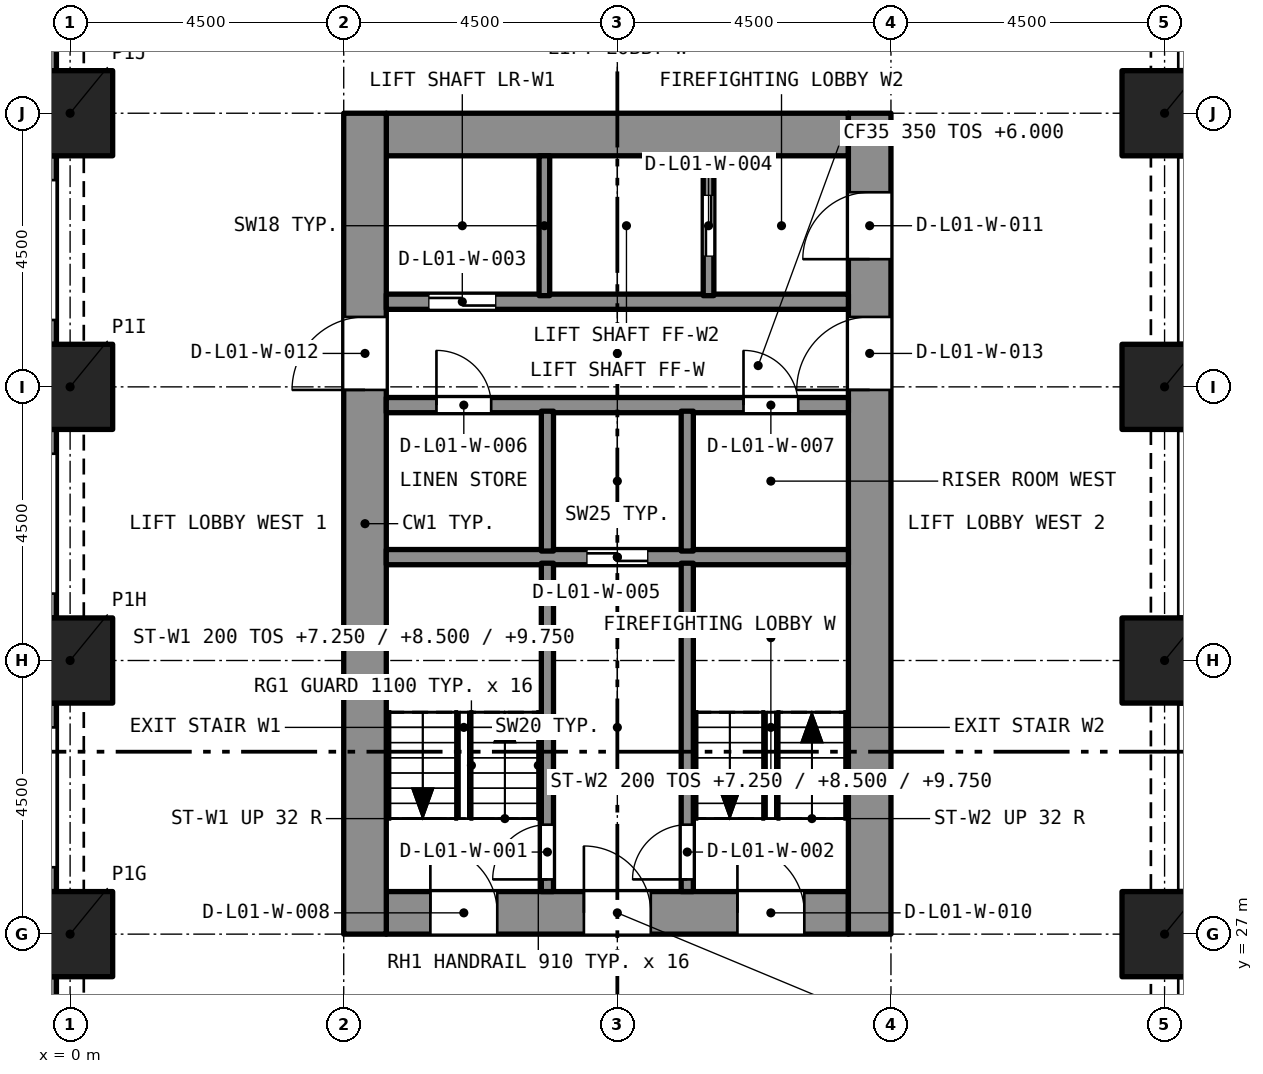
"""IFC4 building model, lengths in metres.
Left out: names, types, materials, properties, quantities, classifications, styles, units other than length and angle.
Written with IfcOpenShell. Run it as: python <this file> out.ifc"""

import sys

from ifc_helpers import new_model, si_unit, direction, frame, frame_2d, origin, origin_2d, place, context, subcontext, project, spatial, rectangle, extrude, element, fill, save


model = new_model("IFC4")
c1 = context("Model", 3, precision=1e-05, world=origin(), true_north=direction((0.0, 1.0)))
c2 = subcontext(c1, "Body", "Model", "MODEL_VIEW")
j1 = project(units=[si_unit("LENGTHUNIT", "METRE"), si_unit("PLANEANGLEUNIT", "RADIAN")], contexts=[c1])
p1 = place(None, origin())
s1 = spatial("IfcSite", under=j1, at=p1, CompositionType="ELEMENT")
p2 = place(p1, origin())
s2 = spatial("IfcBuilding", under=s1, at=p2, CompositionType="ELEMENT")
p3 = place(p2, frame((0.0, 0.0, 6.0)))
s3 = spatial("IfcBuildingStorey", under=s2, at=p3, CompositionType="ELEMENT", Elevation=6.0)
for number, where, z_axis, x_axis in (
    (1, (0.0, 27.0, 0.0), (0.0, 0.0, 1.0), (1.0, 0.0, 0.0)),
    (2, (18.0, 27.0, 0.0), (0.0, 0.0, 1.0), (1.0, 0.0, 0.0)),
    (3, (0.0, 31.5, 0.0), (0.0, 0.0, 1.0), (1.0, 0.0, 0.0)),
    (4, (18.0, 31.5, 0.0), (0.0, 0.0, 1.0), (1.0, 0.0, 0.0)),
    (5, (0.0, 36.0, 0.0), (0.0, 0.0, 1.0), (1.0, 0.0, 0.0)),
    (6, (18.0, 36.0, 0.0), (0.0, 0.0, 1.0), (1.0, 0.0, 0.0)),
    (7, (0.0, 40.5, 0.0), (0.0, 0.0, 1.0), (1.0, 0.0, 0.0)),
    (8, (18.0, 40.5, 0.0), (0.0, 0.0, 1.0), (1.0, 0.0, 0.0)),
):
    element("IfcColumn", number, at=place(p3, frame(where, z_axis=z_axis, x_axis=x_axis)), inside=s3, PredefinedType="COLUMN", context=c2, shape_type="SweptSolid", body=[
        extrude(rectangle(XDim=1.4, YDim=1.4, at=origin_2d()), origin(), (0.0, 0.0, 1.0), 5.0),
    ])
p4 = place(p3, frame((5.2, 27.35, 0.0), z_axis=(0.0, 0.0, 1.0), x_axis=(1.0, 0.0, 0.0)))
e9 = element("IfcWall", 9, at=p4, inside=s3, PredefinedType="SOLIDWALL", context=c2, shape_type="SweptSolid", body=[
    extrude(rectangle(XDim=7.6, YDim=0.7, at=frame_2d((3.8, 0.0))), origin(), (0.0, 0.0, 1.0), 5.0),
])
p5 = place(p4, frame((0.725, 0.0, 0.0)))
e10 = element("IfcOpeningElement", 10, at=p5, cuts=e9, PredefinedType="OPENING", context=c2, shape_type="SweptSolid", body=[
    extrude(rectangle(XDim=1.1, YDim=2.1, at=frame_2d((0.55, 1.05))), frame((0.0, 0.36, 0.0), z_axis=(0.0, -1.0, 0.0), x_axis=(1.0, 0.0, 0.0)), (0.0, 0.0, 1.0), 0.72),
])
p6 = place(p4, frame((3.25, 0.0, 0.0)))
e11 = element("IfcOpeningElement", 11, at=p6, cuts=e9, PredefinedType="OPENING", context=c2, shape_type="SweptSolid", body=[
    extrude(rectangle(XDim=1.1, YDim=2.1, at=frame_2d((0.55, 1.05))), frame((0.0, 0.36, 0.0), z_axis=(0.0, -1.0, 0.0), x_axis=(1.0, 0.0, 0.0)), (0.0, 0.0, 1.0), 0.72),
])
p7 = place(p4, frame((5.775, 0.0, 0.0)))
e12 = element("IfcOpeningElement", 12, at=p7, cuts=e9, PredefinedType="OPENING", context=c2, shape_type="SweptSolid", body=[
    extrude(rectangle(XDim=1.1, YDim=2.1, at=frame_2d((0.55, 1.05))), frame((0.0, 0.36, 0.0), z_axis=(0.0, -1.0, 0.0), x_axis=(1.0, 0.0, 0.0)), (0.0, 0.0, 1.0), 0.72),
])
p8 = place(p3, frame((5.2, 40.15, 0.0), z_axis=(0.0, 0.0, 1.0), x_axis=(1.0, 0.0, 0.0)))
e13 = element("IfcWall", 13, at=p8, inside=s3, PredefinedType="SOLIDWALL", context=c2, shape_type="SweptSolid", body=[
    extrude(rectangle(XDim=7.6, YDim=0.7, at=frame_2d((3.8, 0.0))), origin(), (0.0, 0.0, 1.0), 5.0),
])
p9 = place(p3, frame((4.85, 27.0, 0.0), z_axis=(0.0, 0.0, 1.0), x_axis=(0.0, 1.0, 0.0)))
e14 = element("IfcWall", 14, at=p9, inside=s3, PredefinedType="SOLIDWALL", context=c2, shape_type="SweptSolid", body=[
    extrude(rectangle(XDim=13.5, YDim=0.7, at=frame_2d((6.75, 0.0))), origin(), (0.0, 0.0, 1.0), 5.0),
])
p10 = place(p9, frame((8.95, 0.0, 0.0)))
e15 = element("IfcOpeningElement", 15, at=p10, cuts=e14, PredefinedType="OPENING", context=c2, shape_type="SweptSolid", body=[
    extrude(rectangle(XDim=1.2, YDim=2.1, at=frame_2d((0.6, 1.05))), frame((0.0, 0.36, 0.0), z_axis=(0.0, -1.0, 0.0), x_axis=(1.0, 0.0, 0.0)), (0.0, 0.0, 1.0), 0.72),
])
p11 = place(p3, frame((13.15, 27.0, 0.0), z_axis=(0.0, 0.0, 1.0), x_axis=(0.0, 1.0, 0.0)))
e16 = element("IfcWall", 16, at=p11, inside=s3, PredefinedType="SOLIDWALL", context=c2, shape_type="SweptSolid", body=[
    extrude(rectangle(XDim=13.5, YDim=0.7, at=frame_2d((6.75, 0.0))), origin(), (0.0, 0.0, 1.0), 5.0),
])
p12 = place(p11, frame((11.1, 0.0, 0.0)))
e17 = element("IfcOpeningElement", 17, at=p12, cuts=e16, PredefinedType="OPENING", context=c2, shape_type="SweptSolid", body=[
    extrude(rectangle(XDim=1.1, YDim=2.1, at=frame_2d((0.55, 1.05))), frame((0.0, 0.36, 0.0), z_axis=(0.0, -1.0, 0.0), x_axis=(1.0, 0.0, 0.0)), (0.0, 0.0, 1.0), 0.72),
])
p13 = place(p11, frame((8.95, 0.0, 0.0)))
e18 = element("IfcOpeningElement", 18, at=p13, cuts=e16, PredefinedType="OPENING", context=c2, shape_type="SweptSolid", body=[
    extrude(rectangle(XDim=1.2, YDim=2.1, at=frame_2d((0.6, 1.05))), frame((0.0, 0.36, 0.0), z_axis=(0.0, -1.0, 0.0), x_axis=(1.0, 0.0, 0.0)), (0.0, 0.0, 1.0), 0.72),
])
p14 = place(p3, frame((-0.375, 41.2, 0.0), z_axis=(0.0, 0.0, 1.0), x_axis=(0.0, 1.0, 0.0)))
e19 = element("IfcWall", 19, at=p14, inside=s3, PredefinedType="SOLIDWALL", context=c2, shape_type="SweptSolid", body=[
    extrude(rectangle(XDim=3.1, YDim=0.3, at=frame_2d((1.55, 0.0))), origin(), (0.0, 0.0, 1.0), 5.0),
])
p15 = place(p14, frame((0.4, 0.0, 0.45)))
e20 = element("IfcOpeningElement", 20, at=p15, cuts=e19, PredefinedType="OPENING", context=c2, shape_type="SweptSolid", body=[
    extrude(rectangle(XDim=2.3, YDim=3.3, at=frame_2d((1.15, 1.65))), frame((0.0, 0.16, 0.0), z_axis=(0.0, -1.0, 0.0), x_axis=(1.0, 0.0, 0.0)), (0.0, 0.0, 1.0), 0.32),
])
p16 = place(p3, frame((-0.375, 36.7, 0.0), z_axis=(0.0, 0.0, 1.0), x_axis=(0.0, 1.0, 0.0)))
e21 = element("IfcWall", 21, at=p16, inside=s3, PredefinedType="SOLIDWALL", context=c2, shape_type="SweptSolid", body=[
    extrude(rectangle(XDim=3.1, YDim=0.3, at=frame_2d((1.55, 0.0))), origin(), (0.0, 0.0, 1.0), 5.0),
])
p17 = place(p16, frame((0.4, 0.0, 0.45)))
e22 = element("IfcOpeningElement", 22, at=p17, cuts=e21, PredefinedType="OPENING", context=c2, shape_type="SweptSolid", body=[
    extrude(rectangle(XDim=2.3, YDim=3.3, at=frame_2d((1.15, 1.65))), frame((0.0, 0.16, 0.0), z_axis=(0.0, -1.0, 0.0), x_axis=(1.0, 0.0, 0.0)), (0.0, 0.0, 1.0), 0.32),
])
p18 = place(p3, frame((-0.375, 32.2, 0.0), z_axis=(0.0, 0.0, 1.0), x_axis=(0.0, 1.0, 0.0)))
e23 = element("IfcWall", 23, at=p18, inside=s3, PredefinedType="SOLIDWALL", context=c2, shape_type="SweptSolid", body=[
    extrude(rectangle(XDim=3.1, YDim=0.3, at=frame_2d((1.55, 0.0))), origin(), (0.0, 0.0, 1.0), 5.0),
])
p19 = place(p18, frame((0.4, 0.0, 0.45)))
e24 = element("IfcOpeningElement", 24, at=p19, cuts=e23, PredefinedType="OPENING", context=c2, shape_type="SweptSolid", body=[
    extrude(rectangle(XDim=2.3, YDim=3.3, at=frame_2d((1.15, 1.65))), frame((0.0, 0.16, 0.0), z_axis=(0.0, -1.0, 0.0), x_axis=(1.0, 0.0, 0.0)), (0.0, 0.0, 1.0), 0.32),
])
p20 = place(p3, frame((-0.375, 27.7, 0.0), z_axis=(0.0, 0.0, 1.0), x_axis=(0.0, 1.0, 0.0)))
e25 = element("IfcWall", 25, at=p20, inside=s3, PredefinedType="SOLIDWALL", context=c2, shape_type="SweptSolid", body=[
    extrude(rectangle(XDim=3.1, YDim=0.3, at=frame_2d((1.55, 0.0))), origin(), (0.0, 0.0, 1.0), 5.0),
])
p21 = place(p20, frame((0.4, 0.0, 0.45)))
e26 = element("IfcOpeningElement", 26, at=p21, cuts=e25, PredefinedType="OPENING", context=c2, shape_type="SweptSolid", body=[
    extrude(rectangle(XDim=2.3, YDim=3.3, at=frame_2d((1.15, 1.65))), frame((0.0, 0.16, 0.0), z_axis=(0.0, -1.0, 0.0), x_axis=(1.0, 0.0, 0.0)), (0.0, 0.0, 1.0), 0.32),
])
p22 = place(p3, frame((-0.375, 23.2, 0.0), z_axis=(0.0, 0.0, 1.0), x_axis=(0.0, 1.0, 0.0)))
e27 = element("IfcWall", 27, at=p22, inside=s3, PredefinedType="SOLIDWALL", context=c2, shape_type="SweptSolid", body=[
    extrude(rectangle(XDim=3.1, YDim=0.3, at=frame_2d((1.55, 0.0))), origin(), (0.0, 0.0, 1.0), 5.0),
])
p23 = place(p22, frame((0.4, 0.0, 0.45)))
e28 = element("IfcOpeningElement", 28, at=p23, cuts=e27, PredefinedType="OPENING", context=c2, shape_type="SweptSolid", body=[
    extrude(rectangle(XDim=2.3, YDim=3.3, at=frame_2d((1.15, 1.65))), frame((0.0, 0.16, 0.0), z_axis=(0.0, -1.0, 0.0), x_axis=(1.0, 0.0, 0.0)), (0.0, 0.0, 1.0), 0.32),
])
p24 = place(p3, frame((5.2, 33.2, 0.0), z_axis=(0.0, 0.0, 1.0), x_axis=(1.0, 0.0, 0.0)))
e29 = element("IfcWall", 29, at=p24, inside=s3, PredefinedType="SOLIDWALL", context=c2, shape_type="SweptSolid", body=[
    extrude(rectangle(XDim=7.6, YDim=0.25, at=frame_2d((3.8, 0.0))), origin(), (0.0, 0.0, 1.0), 4.65),
])
p25 = place(p24, frame((3.3, 0.0, 0.0)))
e30 = element("IfcOpeningElement", 30, at=p25, cuts=e29, PredefinedType="OPENING", context=c2, shape_type="SweptSolid", body=[
    extrude(rectangle(XDim=1.0, YDim=2.1, at=frame_2d((0.5, 1.05))), frame((0.0, 0.135, 0.0), z_axis=(0.0, -1.0, 0.0), x_axis=(1.0, 0.0, 0.0)), (0.0, 0.0, 1.0), 0.27),
])
p26 = place(p3, frame((5.2, 35.7, 0.0), z_axis=(0.0, 0.0, 1.0), x_axis=(1.0, 0.0, 0.0)))
e31 = element("IfcWall", 31, at=p26, inside=s3, PredefinedType="SOLIDWALL", context=c2, shape_type="SweptSolid", body=[
    extrude(rectangle(XDim=7.6, YDim=0.25, at=frame_2d((3.8, 0.0))), origin(), (0.0, 0.0, 1.0), 4.65),
])
p27 = place(p26, frame((0.825, 0.0, 0.0)))
e32 = element("IfcOpeningElement", 32, at=p27, cuts=e31, PredefinedType="OPENING", context=c2, shape_type="SweptSolid", body=[
    extrude(rectangle(XDim=0.9, YDim=2.1, at=frame_2d((0.45, 1.05))), frame((0.0, 0.135, 0.0), z_axis=(0.0, -1.0, 0.0), x_axis=(1.0, 0.0, 0.0)), (0.0, 0.0, 1.0), 0.27),
])
p28 = place(p26, frame((5.875, 0.0, 0.0)))
e33 = element("IfcOpeningElement", 33, at=p28, cuts=e31, PredefinedType="OPENING", context=c2, shape_type="SweptSolid", body=[
    extrude(rectangle(XDim=0.9, YDim=2.1, at=frame_2d((0.45, 1.05))), frame((0.0, 0.135, 0.0), z_axis=(0.0, -1.0, 0.0), x_axis=(1.0, 0.0, 0.0)), (0.0, 0.0, 1.0), 0.27),
])
p29 = place(p3, frame((5.2, 37.4, 0.0), z_axis=(0.0, 0.0, 1.0), x_axis=(1.0, 0.0, 0.0)))
e34 = element("IfcWall", 34, at=p29, inside=s3, PredefinedType="SOLIDWALL", context=c2, shape_type="SweptSolid", body=[
    extrude(rectangle(XDim=7.6, YDim=0.25, at=frame_2d((3.8, 0.0))), origin(), (0.0, 0.0, 1.0), 4.65),
])
p30 = place(p29, frame((0.7, 0.0, 0.0)))
e35 = element("IfcOpeningElement", 35, at=p30, cuts=e34, PredefinedType="OPENING", context=c2, shape_type="SweptSolid", body=[
    extrude(rectangle(XDim=1.1, YDim=2.4, at=frame_2d((0.55, 1.2))), frame((0.0, 0.135, 0.0), z_axis=(0.0, -1.0, 0.0), x_axis=(1.0, 0.0, 0.0)), (0.0, 0.0, 1.0), 0.27),
])
p31 = place(p3, frame((7.85, 27.7, 0.0), z_axis=(0.0, 0.0, 1.0), x_axis=(0.0, 1.0, 0.0)))
e36 = element("IfcWall", 36, at=p31, inside=s3, PredefinedType="SOLIDWALL", context=c2, shape_type="SweptSolid", body=[
    extrude(rectangle(XDim=5.4, YDim=0.2, at=frame_2d((2.7, 0.0))), origin(), (0.0, 0.0, 1.0), 4.65),
])
p32 = place(p31, frame((0.2, 0.0, 0.0)))
e37 = element("IfcOpeningElement", 37, at=p32, cuts=e36, PredefinedType="OPENING", context=c2, shape_type="SweptSolid", body=[
    extrude(rectangle(XDim=0.9, YDim=2.1, at=frame_2d((0.45, 1.05))), frame((0.0, 0.11, 0.0), z_axis=(0.0, -1.0, 0.0), x_axis=(1.0, 0.0, 0.0)), (0.0, 0.0, 1.0), 0.22),
])
p33 = place(p3, frame((10.15, 27.7, 0.0), z_axis=(0.0, 0.0, 1.0), x_axis=(0.0, 1.0, 0.0)))
e38 = element("IfcWall", 38, at=p33, inside=s3, PredefinedType="SOLIDWALL", context=c2, shape_type="SweptSolid", body=[
    extrude(rectangle(XDim=5.4, YDim=0.2, at=frame_2d((2.7, 0.0))), origin(), (0.0, 0.0, 1.0), 4.65),
])
p34 = place(p33, frame((0.2, 0.0, 0.0)))
e39 = element("IfcOpeningElement", 39, at=p34, cuts=e38, PredefinedType="OPENING", context=c2, shape_type="SweptSolid", body=[
    extrude(rectangle(XDim=0.9, YDim=2.1, at=frame_2d((0.45, 1.05))), frame((0.0, 0.11, 0.0), z_axis=(0.0, -1.0, 0.0), x_axis=(1.0, 0.0, 0.0)), (0.0, 0.0, 1.0), 0.22),
])
for number, where, z_axis, x_axis in (
    (40, (7.85, 33.3, 0.0), (0.0, 0.0, 1.0), (0.0, 1.0, 0.0)),
    (41, (10.15, 33.3, 0.0), (0.0, 0.0, 1.0), (0.0, 1.0, 0.0)),
):
    element("IfcWall", number, at=place(p3, frame(where, z_axis=z_axis, x_axis=x_axis)), inside=s3, PredefinedType="SOLIDWALL", context=c2, shape_type="SweptSolid", body=[
        extrude(rectangle(XDim=2.3, YDim=0.2, at=frame_2d((1.15, 0.0))), origin(), (0.0, 0.0, 1.0), 4.65),
    ])
p35 = place(p3, frame((7.8, 37.5, 0.0), z_axis=(0.0, 0.0, 1.0), x_axis=(0.0, 1.0, 0.0)))
e42 = element("IfcWall", 42, at=p35, inside=s3, PredefinedType="SOLIDWALL", context=c2, shape_type="SweptSolid", body=[
    extrude(rectangle(XDim=2.3, YDim=0.175, at=frame_2d((1.15, 0.0))), origin(), (0.0, 0.0, 1.0), 4.65),
])
p36 = place(p3, frame((10.5, 37.5, 0.0), z_axis=(0.0, 0.0, 1.0), x_axis=(0.0, 1.0, 0.0)))
e43 = element("IfcWall", 43, at=p36, inside=s3, PredefinedType="SOLIDWALL", context=c2, shape_type="SweptSolid", body=[
    extrude(rectangle(XDim=2.3, YDim=0.175, at=frame_2d((1.15, 0.0))), origin(), (0.0, 0.0, 1.0), 4.65),
])
p37 = place(p36, frame((0.65, 0.0, 0.0)))
e44 = element("IfcOpeningElement", 44, at=p37, cuts=e43, PredefinedType="OPENING", context=c2, shape_type="SweptSolid", body=[
    extrude(rectangle(XDim=1.0, YDim=2.1, at=frame_2d((0.5, 1.05))), frame((0.0, 0.097, 0.0), z_axis=(0.0, -1.0, 0.0), x_axis=(1.0, 0.0, 0.0)), (0.0, 0.0, 1.0), 0.195),
])
p38 = place(p32, origin())
e45 = element("IfcDoor", 45, at=p38, inside=s3, OperationType="SINGLE_SWING_LEFT", PredefinedType="DOOR", context=c2, shape_type="SweptSolid", body=[
    extrude(rectangle(XDim=0.9, YDim=2.1, at=frame_2d((0.45, 1.05))), frame((0.0, 0.025, 0.0), z_axis=(0.0, -1.0, 0.0), x_axis=(1.0, 0.0, 0.0)), (0.0, 0.0, 1.0), 0.05),
])
fill(e37, e45)
p39 = place(p34, origin())
e46 = element("IfcDoor", 46, at=p39, inside=s3, OperationType="SINGLE_SWING_LEFT", PredefinedType="DOOR", context=c2, shape_type="SweptSolid", body=[
    extrude(rectangle(XDim=0.9, YDim=2.1, at=frame_2d((0.45, 1.05))), frame((0.0, 0.025, 0.0), z_axis=(0.0, -1.0, 0.0), x_axis=(1.0, 0.0, 0.0)), (0.0, 0.0, 1.0), 0.05),
])
fill(e39, e46)
p40 = place(p30, origin())
e47 = element("IfcDoor", 47, at=p40, inside=s3, OperationType="SLIDING_TO_LEFT", PredefinedType="DOOR", context=c2, shape_type="SweptSolid", body=[
    extrude(rectangle(XDim=1.1, YDim=2.4, at=frame_2d((0.55, 1.2))), frame((0.0, 0.025, 0.0), z_axis=(0.0, -1.0, 0.0), x_axis=(1.0, 0.0, 0.0)), (0.0, 0.0, 1.0), 0.05),
])
fill(e35, e47)
p41 = place(p37, origin())
e48 = element("IfcDoor", 48, at=p41, inside=s3, OperationType="SLIDING_TO_LEFT", PredefinedType="DOOR", context=c2, shape_type="SweptSolid", body=[
    extrude(rectangle(XDim=1.0, YDim=2.1, at=frame_2d((0.5, 1.05))), frame((0.0, 0.025, 0.0), z_axis=(0.0, -1.0, 0.0), x_axis=(1.0, 0.0, 0.0)), (0.0, 0.0, 1.0), 0.05),
])
fill(e44, e48)
p42 = place(p25, origin())
e49 = element("IfcDoor", 49, at=p42, inside=s3, OperationType="SLIDING_TO_LEFT", PredefinedType="DOOR", context=c2, shape_type="SweptSolid", body=[
    extrude(rectangle(XDim=1.0, YDim=2.1, at=frame_2d((0.5, 1.05))), frame((0.0, 0.025, 0.0), z_axis=(0.0, -1.0, 0.0), x_axis=(1.0, 0.0, 0.0)), (0.0, 0.0, 1.0), 0.05),
])
fill(e30, e49)
p43 = place(p27, origin())
e50 = element("IfcDoor", 50, at=p43, inside=s3, OperationType="SINGLE_SWING_LEFT", PredefinedType="DOOR", context=c2, shape_type="SweptSolid", body=[
    extrude(rectangle(XDim=0.9, YDim=2.1, at=frame_2d((0.45, 1.05))), frame((0.0, 0.025, 0.0), z_axis=(0.0, -1.0, 0.0), x_axis=(1.0, 0.0, 0.0)), (0.0, 0.0, 1.0), 0.05),
])
fill(e32, e50)
p44 = place(p28, origin())
e51 = element("IfcDoor", 51, at=p44, inside=s3, OperationType="SINGLE_SWING_LEFT", PredefinedType="DOOR", context=c2, shape_type="SweptSolid", body=[
    extrude(rectangle(XDim=0.9, YDim=2.1, at=frame_2d((0.45, 1.05))), frame((0.0, 0.025, 0.0), z_axis=(0.0, -1.0, 0.0), x_axis=(1.0, 0.0, 0.0)), (0.0, 0.0, 1.0), 0.05),
])
fill(e33, e51)
p45 = place(p5, origin())
e52 = element("IfcDoor", 52, at=p45, inside=s3, OperationType="SINGLE_SWING_LEFT", PredefinedType="DOOR", context=c2, shape_type="SweptSolid", body=[
    extrude(rectangle(XDim=1.1, YDim=2.1, at=frame_2d((0.55, 1.05))), frame((0.0, 0.025, 0.0), z_axis=(0.0, -1.0, 0.0), x_axis=(1.0, 0.0, 0.0)), (0.0, 0.0, 1.0), 0.05),
])
fill(e10, e52)
p46 = place(p6, origin())
e53 = element("IfcDoor", 53, at=p46, inside=s3, OperationType="SINGLE_SWING_LEFT", PredefinedType="DOOR", context=c2, shape_type="SweptSolid", body=[
    extrude(rectangle(XDim=1.1, YDim=2.1, at=frame_2d((0.55, 1.05))), frame((0.0, 0.025, 0.0), z_axis=(0.0, -1.0, 0.0), x_axis=(1.0, 0.0, 0.0)), (0.0, 0.0, 1.0), 0.05),
])
fill(e11, e53)
p47 = place(p7, origin())
e54 = element("IfcDoor", 54, at=p47, inside=s3, OperationType="SINGLE_SWING_LEFT", PredefinedType="DOOR", context=c2, shape_type="SweptSolid", body=[
    extrude(rectangle(XDim=1.1, YDim=2.1, at=frame_2d((0.55, 1.05))), frame((0.0, 0.025, 0.0), z_axis=(0.0, -1.0, 0.0), x_axis=(1.0, 0.0, 0.0)), (0.0, 0.0, 1.0), 0.05),
])
fill(e12, e54)
p48 = place(p12, origin())
e55 = element("IfcDoor", 55, at=p48, inside=s3, OperationType="SINGLE_SWING_LEFT", PredefinedType="DOOR", context=c2, shape_type="SweptSolid", body=[
    extrude(rectangle(XDim=1.1, YDim=2.1, at=frame_2d((0.55, 1.05))), frame((0.0, 0.025, 0.0), z_axis=(0.0, -1.0, 0.0), x_axis=(1.0, 0.0, 0.0)), (0.0, 0.0, 1.0), 0.05),
])
fill(e17, e55)
p49 = place(p10, origin())
e56 = element("IfcDoor", 56, at=p49, inside=s3, OperationType="SINGLE_SWING_LEFT", PredefinedType="DOOR", context=c2, shape_type="SweptSolid", body=[
    extrude(rectangle(XDim=1.2, YDim=2.1, at=frame_2d((0.6, 1.05))), frame((0.0, 0.025, 0.0), z_axis=(0.0, -1.0, 0.0), x_axis=(1.0, 0.0, 0.0)), (0.0, 0.0, 1.0), 0.05),
])
fill(e15, e56)
p50 = place(p13, origin())
e57 = element("IfcDoor", 57, at=p50, inside=s3, OperationType="SINGLE_SWING_LEFT", PredefinedType="DOOR", context=c2, shape_type="SweptSolid", body=[
    extrude(rectangle(XDim=1.2, YDim=2.1, at=frame_2d((0.6, 1.05))), frame((0.0, 0.025, 0.0), z_axis=(0.0, -1.0, 0.0), x_axis=(1.0, 0.0, 0.0)), (0.0, 0.0, 1.0), 0.05),
])
fill(e18, e57)
save(model, sys.argv[1])
